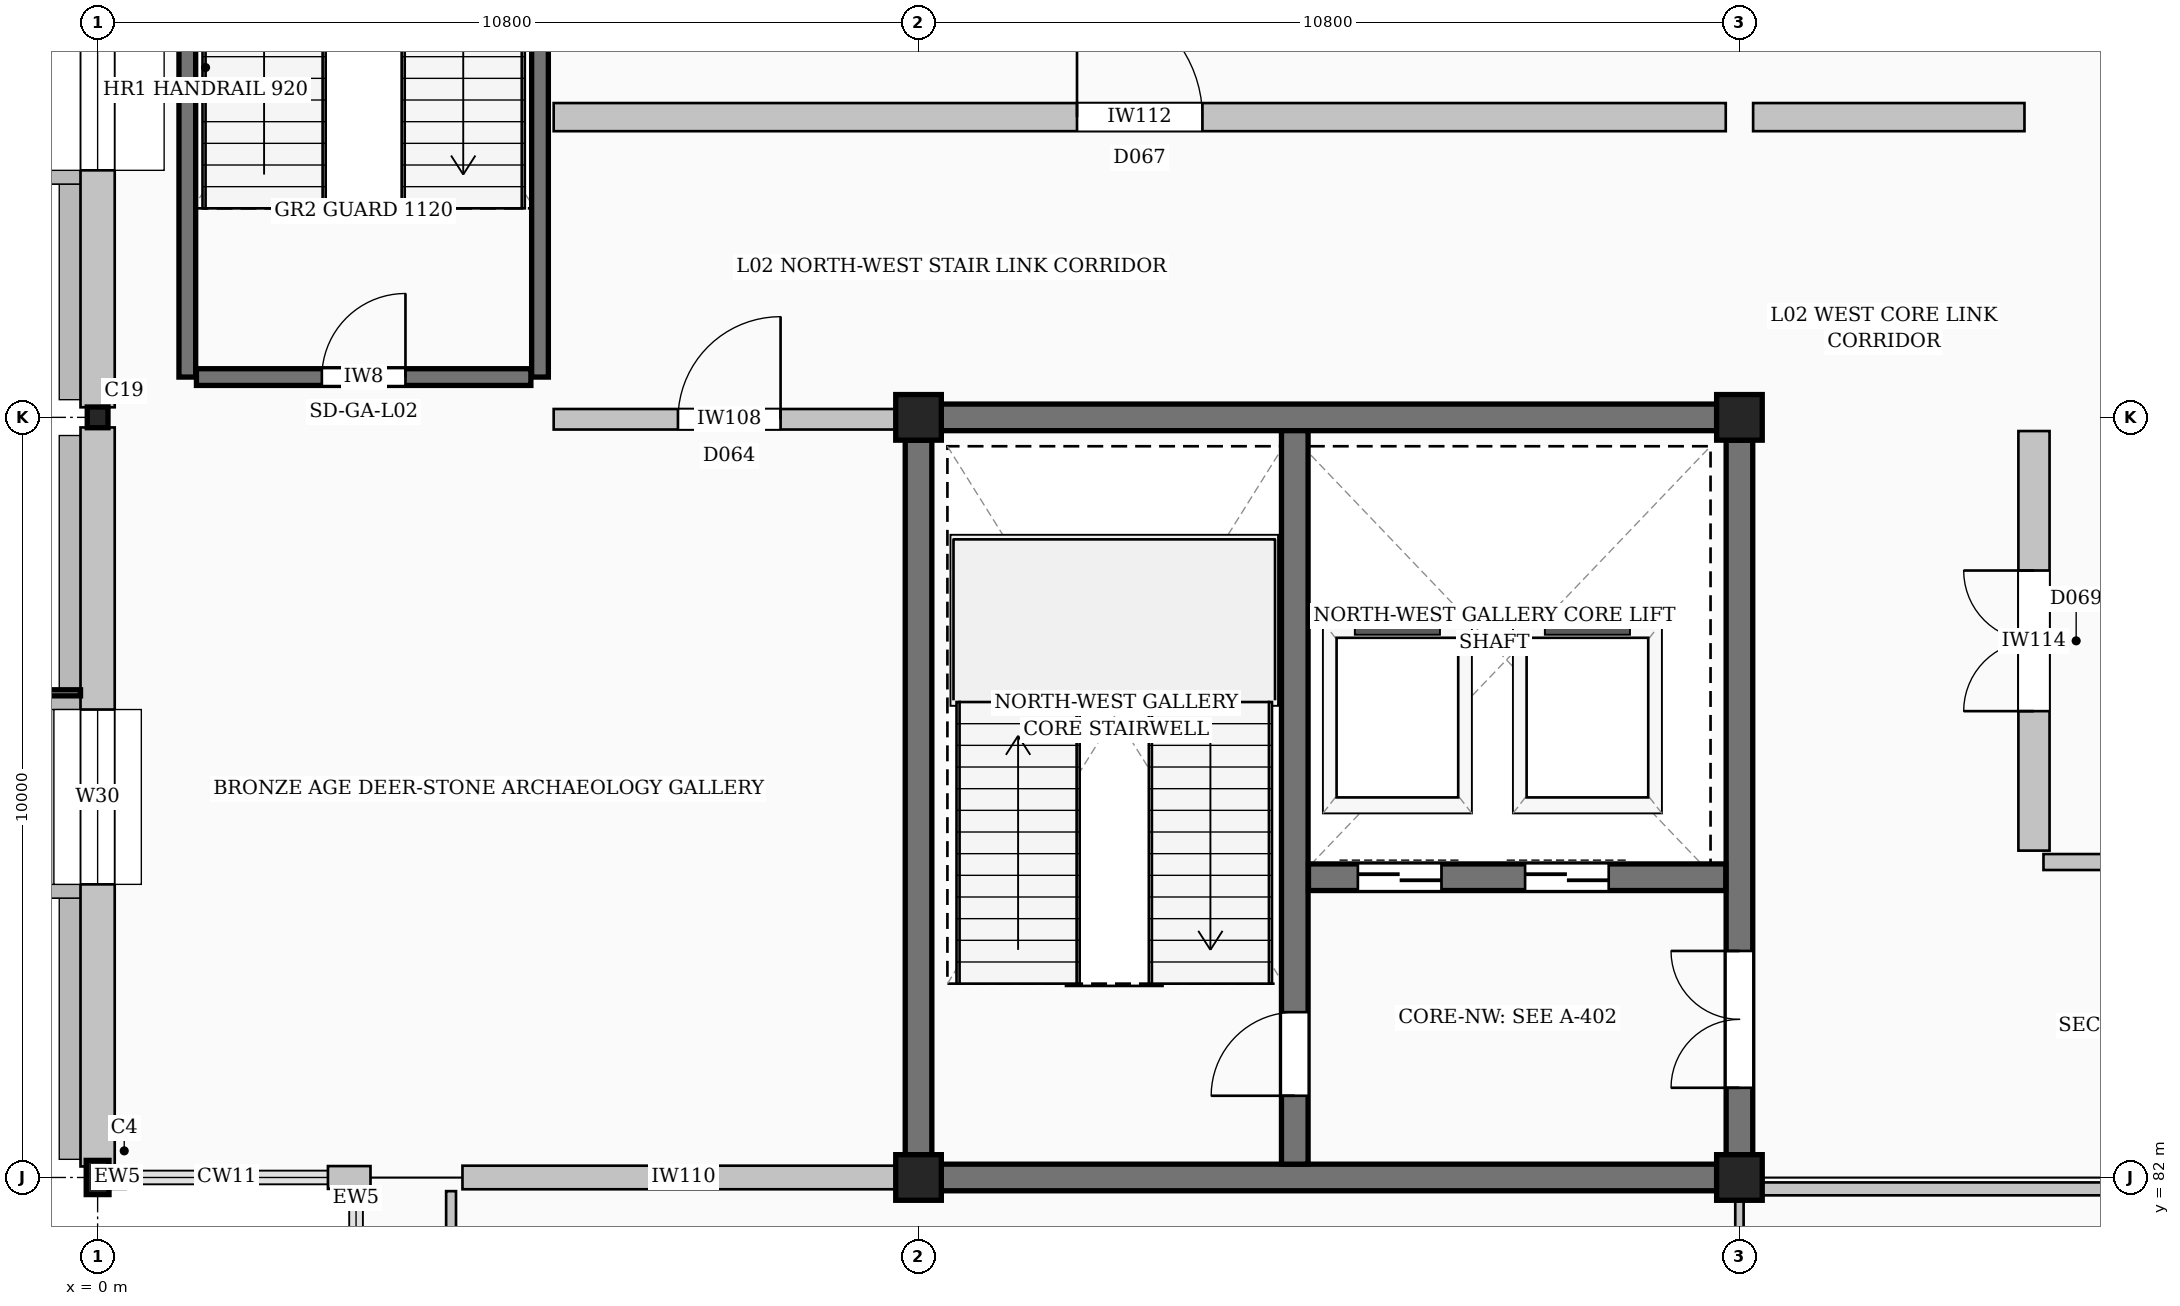
"""IFC4 building model, lengths in metres.
Left out: names, types, materials, properties, quantities, classifications, styles, units other than length and angle.
Written with IfcOpenShell. Run it as: python <this file> out.ifc"""

import sys

from ifc_helpers import new_model, si_unit, direction, frame, frame_2d, origin, origin_2d, place, context, subcontext, project, spatial, rectangle, hollow_circle, i_section, extrude, element, fill, save


model = new_model("IFC4")
c1 = context("Model", 3, precision=1e-05, world=origin(), true_north=direction((0.0, 1.0)))
c2 = subcontext(c1, "Body", "Model", "MODEL_VIEW")
j1 = project(units=[si_unit("LENGTHUNIT", "METRE"), si_unit("PLANEANGLEUNIT", "RADIAN")], contexts=[c1])
p1 = place(None, origin())
s1 = spatial("IfcSite", under=j1, at=p1, CompositionType="ELEMENT")
p2 = place(p1, origin())
s2 = spatial("IfcBuilding", under=s1, at=p2, CompositionType="ELEMENT")
p3 = place(p2, frame((0.0, 0.0, 9.6)))
s3 = spatial("IfcBuildingStorey", under=s2, at=p3, CompositionType="ELEMENT", Elevation=9.6)
p4 = place(p3, frame((0.0, 82.0, 0.0), z_axis=(0.0, 0.0, 1.0), x_axis=(1.0, 0.0, 0.0)))
e1 = element("IfcColumn", 1, at=p4, inside=s3, PredefinedType="COLUMN", context=c2, shape_type="SweptSolid", body=[
    extrude(i_section(OverallWidth=0.3, OverallDepth=0.45, WebThickness=0.014, FlangeThickness=0.026, FilletRadius=0.027, at=origin_2d()), origin(), (0.0, 0.0, 1.0), 4.8),
])
p5 = place(p3, frame((0.0, 92.0, 0.0), z_axis=(0.0, 0.0, 1.0), x_axis=(1.0, 0.0, 0.0)))
e2 = element("IfcColumn", 2, at=p5, inside=s3, PredefinedType="COLUMN", context=c2, shape_type="SweptSolid", body=[
    extrude(hollow_circle(Radius=0.136, WallThickness=0.012, at=origin_2d()), origin(), (0.0, 0.0, 1.0), 4.8),
])
for number, where, z_axis, x_axis in (
    (3, (10.8, 82.0, 0.0), (0.0, 0.0, 1.0), (1.0, 0.0, 0.0)),
    (4, (10.8, 92.0, 0.0), (0.0, 0.0, 1.0), (1.0, 0.0, 0.0)),
    (5, (21.6, 82.0, 0.0), (0.0, 0.0, 1.0), (1.0, 0.0, 0.0)),
    (6, (21.6, 92.0, 0.0), (0.0, 0.0, 1.0), (1.0, 0.0, 0.0)),
):
    element("IfcColumn", number, at=place(p3, frame(where, z_axis=z_axis, x_axis=x_axis)), inside=s3, PredefinedType="COLUMN", context=c2, shape_type="SweptSolid", body=[
        extrude(rectangle(XDim=0.6, YDim=0.6, at=origin_2d()), origin(), (0.0, 0.0, 1.0), 4.8),
    ])
p6 = place(p3, frame((0.0, 101.867, 0.0), z_axis=(0.0, 0.0, 1.0), x_axis=(0.0, -1.0, 0.0)))
e7 = element("IfcWall", 7, at=p6, inside=s3, PredefinedType="STANDARD", context=c2, shape_type="SweptSolid", body=[
    extrude(rectangle(XDim=9.735, YDim=0.45, at=frame_2d((4.867, 0.0))), origin(), (0.0, 0.0, 1.0), 4.56),
])
p7 = place(p6, frame((3.117, 0.0, 1.0)))
e8 = element("IfcOpeningElement", 8, at=p7, cuts=e7, PredefinedType="OPENING", context=c2, shape_type="SweptSolid", body=[
    extrude(rectangle(XDim=3.5, YDim=2.3, at=frame_2d((1.75, 1.15))), frame((0.0, 0.235, 0.0), z_axis=(0.0, -1.0, 0.0), x_axis=(1.0, 0.0, 0.0)), (0.0, 0.0, 1.0), 0.47),
])
p8 = place(p3, frame((0.0, 91.867, 0.0), z_axis=(0.0, 0.0, 1.0), x_axis=(0.0, -1.0, 0.0)))
e9 = element("IfcWall", 9, at=p8, inside=s3, PredefinedType="STANDARD", context=c2, shape_type="SweptSolid", body=[
    extrude(rectangle(XDim=9.722, YDim=0.45, at=frame_2d((4.861, 0.0))), origin(), (0.0, 0.0, 1.0), 4.56),
])
p9 = place(p8, frame((3.711, 0.0, 1.0)))
e10 = element("IfcOpeningElement", 10, at=p9, cuts=e9, PredefinedType="OPENING", context=c2, shape_type="SweptSolid", body=[
    extrude(rectangle(XDim=2.3, YDim=2.3, at=frame_2d((1.15, 1.15))), frame((0.0, 0.235, 0.0), z_axis=(0.0, -1.0, 0.0), x_axis=(1.0, 0.0, 0.0)), (0.0, 0.0, 1.0), 0.47),
])
p10 = place(p3, frame((0.145, 82.0, 0.0), z_axis=(0.0, 0.0, 1.0), x_axis=(1.0, 0.0, 0.0)))
e11 = element("IfcWall", 11, at=p10, inside=s3, PredefinedType="STANDARD", context=c2, shape_type="SweptSolid", body=[
    extrude(rectangle(XDim=0.225, YDim=0.3, at=frame_2d((0.113, 0.0))), origin(), (0.0, 0.0, 1.0), 4.56),
])
p11 = place(p3, frame((3.03, 82.0, 0.0), z_axis=(0.0, 0.0, 1.0), x_axis=(1.0, 0.0, 0.0)))
e12 = element("IfcWall", 12, at=p11, inside=s3, PredefinedType="STANDARD", context=c2, shape_type="SweptSolid", body=[
    extrude(rectangle(XDim=0.56, YDim=0.3, at=frame_2d((0.28, 0.0))), origin(), (0.0, 0.0, 1.0), 4.56),
])
p12 = place(p3, frame((3.4, 81.82, 0.0), z_axis=(0.0, 0.0, 1.0), x_axis=(0.0, -1.0, 0.0)))
e13 = element("IfcWall", 13, at=p12, inside=s3, PredefinedType="STANDARD", context=c2, shape_type="SweptSolid", body=[
    extrude(rectangle(XDim=0.19, YDim=0.3, at=frame_2d((0.095, 0.0))), origin(), (0.0, 0.0, 1.0), 4.56),
])
for number, where, z_axis, x_axis in (
    (14, (11.1, 82.0, 0.0), (0.0, 0.0, 1.0), (1.0, 0.0, 0.0)),
    (15, (11.1, 92.0, 0.0), (0.0, 0.0, 1.0), (1.0, 0.0, 0.0)),
):
    element("IfcWall", number, at=place(p3, frame(where, z_axis=z_axis, x_axis=x_axis)), inside=s3, PredefinedType="SHEAR", context=c2, shape_type="SweptSolid", body=[
        extrude(rectangle(XDim=10.2, YDim=0.35, at=frame_2d((5.1, 0.0))), origin(), (0.0, 0.0, 1.0), 4.56),
    ])
p13 = place(p3, frame((10.8, 82.3, 0.0), z_axis=(0.0, 0.0, 1.0), x_axis=(0.0, 1.0, 0.0)))
e16 = element("IfcWall", 16, at=p13, inside=s3, PredefinedType="SHEAR", context=c2, shape_type="SweptSolid", body=[
    extrude(rectangle(XDim=9.4, YDim=0.35, at=frame_2d((4.7, 0.0))), origin(), (0.0, 0.0, 1.0), 4.56),
])
p14 = place(p3, frame((21.6, 82.3, 0.0), z_axis=(0.0, 0.0, 1.0), x_axis=(0.0, 1.0, 0.0)))
e17 = element("IfcWall", 17, at=p14, inside=s3, PredefinedType="SHEAR", context=c2, shape_type="SweptSolid", body=[
    extrude(rectangle(XDim=9.4, YDim=0.35, at=frame_2d((4.7, 0.0))), origin(), (0.0, 0.0, 1.0), 4.56),
])
p15 = place(p14, frame((0.88, 0.0, 0.0)))
e18 = element("IfcOpeningElement", 18, at=p15, cuts=e17, PredefinedType="OPENING", context=c2, shape_type="SweptSolid", body=[
    extrude(rectangle(XDim=1.8, YDim=2.25, at=frame_2d((0.9, 1.125))), frame((0.0, 0.185, 0.0), z_axis=(0.0, -1.0, 0.0), x_axis=(1.0, 0.0, 0.0)), (0.0, 0.0, 1.0), 0.37),
])
p16 = place(p3, frame((15.75, 82.175, 0.0), z_axis=(0.0, 0.0, 1.0), x_axis=(0.0, 1.0, 0.0)))
e19 = element("IfcWall", 19, at=p16, inside=s3, PredefinedType="SHEAR", context=c2, shape_type="SweptSolid", body=[
    extrude(rectangle(XDim=9.65, YDim=0.35, at=frame_2d((4.825, 0.0))), origin(), (0.0, 0.0, 1.0), 4.56),
])
p17 = place(p16, frame((0.9, 0.0, 0.0)))
e20 = element("IfcOpeningElement", 20, at=p17, cuts=e19, PredefinedType="OPENING", context=c2, shape_type="SweptSolid", body=[
    extrude(rectangle(XDim=1.1, YDim=2.2, at=frame_2d((0.55, 1.1))), frame((0.0, 0.185, 0.0), z_axis=(0.0, -1.0, 0.0), x_axis=(1.0, 0.0, 0.0)), (0.0, 0.0, 1.0), 0.37),
])
p18 = place(p3, frame((15.93, 85.95, 0.0), z_axis=(0.0, 0.0, 1.0), x_axis=(1.0, 0.0, 0.0)))
e21 = element("IfcWall", 21, at=p18, inside=s3, PredefinedType="SHEAR", context=c2, shape_type="SweptSolid", body=[
    extrude(rectangle(XDim=5.49, YDim=0.35, at=frame_2d((2.745, 0.0))), origin(), (0.0, 0.0, 1.0), 4.56),
])
p19 = place(p18, frame((0.65, 0.0, 0.0)))
e22 = element("IfcOpeningElement", 22, at=p19, cuts=e21, PredefinedType="OPENING", context=c2, shape_type="SweptSolid", body=[
    extrude(rectangle(XDim=1.1, YDim=2.2, at=frame_2d((0.55, 1.1))), frame((0.0, 0.185, 0.0), z_axis=(0.0, -1.0, 0.0), x_axis=(1.0, 0.0, 0.0)), (0.0, 0.0, 1.0), 0.37),
])
p20 = place(p18, frame((2.85, 0.0, 0.0)))
e23 = element("IfcOpeningElement", 23, at=p20, cuts=e21, PredefinedType="OPENING", context=c2, shape_type="SweptSolid", body=[
    extrude(rectangle(XDim=1.1, YDim=2.2, at=frame_2d((0.55, 1.1))), frame((0.0, 0.185, 0.0), z_axis=(0.0, -1.0, 0.0), x_axis=(1.0, 0.0, 0.0)), (0.0, 0.0, 1.0), 0.37),
])
for number, where, z_axis, x_axis in (
    (24, (1.18, 92.53, 0.0), (0.0, 0.0, 1.0), (0.0, 1.0, 0.0)),
    (25, (5.82, 92.53, 0.0), (0.0, 0.0, 1.0), (0.0, 1.0, 0.0)),
):
    element("IfcWall", number, at=place(p3, frame(where, z_axis=z_axis, x_axis=x_axis)), inside=s3, PredefinedType="SHEAR", context=c2, shape_type="SweptSolid", body=[
        extrude(rectangle(XDim=9.14, YDim=0.22, at=frame_2d((4.57, 0.0))), origin(), (0.0, 0.0, 1.0), 4.56),
    ])
p21 = place(p3, frame((1.3, 92.53, 0.0), z_axis=(0.0, 0.0, 1.0), x_axis=(1.0, 0.0, 0.0)))
e26 = element("IfcWall", 26, at=p21, inside=s3, PredefinedType="SHEAR", context=c2, shape_type="SweptSolid", body=[
    extrude(rectangle(XDim=4.4, YDim=0.22, at=frame_2d((2.2, 0.0))), origin(), (0.0, 0.0, 1.0), 4.56),
])
p22 = place(p21, frame((1.65, 0.0, 0.0)))
e27 = element("IfcOpeningElement", 27, at=p22, cuts=e26, PredefinedType="OPENING", context=c2, shape_type="SweptSolid", body=[
    extrude(rectangle(XDim=1.1, YDim=2.2, at=frame_2d((0.55, 1.1))), frame((0.0, 0.12, 0.0), z_axis=(0.0, -1.0, 0.0), x_axis=(1.0, 0.0, 0.0)), (0.0, 0.0, 1.0), 0.24),
])
p23 = place(p3, frame((21.78, 81.85, 0.0), z_axis=(0.0, 0.0, 1.0), x_axis=(1.0, 0.0, 0.0)))
e28 = element("IfcWall", 28, at=p23, inside=s3, PredefinedType="PARTITIONING", context=c2, shape_type="SweptSolid", body=[
    extrude(rectangle(XDim=10.42, YDim=0.17, at=frame_2d((5.21, 0.0))), origin(), (0.0, 0.0, 1.0), 3.94),
])
p24 = place(p3, frame((25.6, 86.15, 0.0), z_axis=(0.0, 0.0, 1.0), x_axis=(1.0, 0.0, 0.0)))
e29 = element("IfcWall", 29, at=p24, inside=s3, PredefinedType="PARTITIONING", context=c2, shape_type="SweptSolid", body=[
    extrude(rectangle(XDim=28.22, YDim=0.21, at=frame_2d((14.11, 0.0))), origin(), (0.0, 0.0, 1.0), 4.52),
])
p25 = place(p24, frame((13.535, 0.0, 0.0)))
e30 = element("IfcOpeningElement", 30, at=p25, cuts=e29, PredefinedType="OPENING", context=c2, shape_type="SweptSolid", body=[
    extrude(rectangle(XDim=1.15, YDim=2.25, at=frame_2d((0.575, 1.125))), frame((0.0, 0.115, 0.0), z_axis=(0.0, -1.0, 0.0), x_axis=(1.0, 0.0, 0.0)), (0.0, 0.0, 1.0), 0.23),
])
p26 = place(p3, frame((6.0, 91.975, 0.0), z_axis=(0.0, 0.0, 1.0), x_axis=(1.0, 0.0, 0.0)))
e31 = element("IfcWall", 31, at=p26, inside=s3, PredefinedType="PARTITIONING", context=c2, shape_type="SweptSolid", body=[
    extrude(rectangle(XDim=4.62, YDim=0.27, at=frame_2d((2.31, 0.0))), origin(), (0.0, 0.0, 1.0), 4.119),
])
p27 = place(p26, frame((1.635, 0.0, 0.0)))
e32 = element("IfcOpeningElement", 32, at=p27, cuts=e31, PredefinedType="OPENING", context=c2, shape_type="SweptSolid", body=[
    extrude(rectangle(XDim=1.35, YDim=2.35, at=frame_2d((0.675, 1.175))), frame((0.0, 0.145, 0.0), z_axis=(0.0, -1.0, 0.0), x_axis=(1.0, 0.0, 0.0)), (0.0, 0.0, 1.0), 0.29),
])
p28 = place(p3, frame((6.0, 95.95, 0.0), z_axis=(0.0, 0.0, 1.0), x_axis=(1.0, 0.0, 0.0)))
e33 = element("IfcWall", 33, at=p28, inside=s3, PredefinedType="PARTITIONING", context=c2, shape_type="SweptSolid", body=[
    extrude(rectangle(XDim=15.42, YDim=0.37, at=frame_2d((7.71, 0.0))), origin(), (0.0, 0.0, 1.0), 4.52),
])
p29 = place(p28, frame((6.885, 0.0, 0.0)))
e34 = element("IfcOpeningElement", 34, at=p29, cuts=e33, PredefinedType="OPENING", context=c2, shape_type="SweptSolid", body=[
    extrude(rectangle(XDim=1.65, YDim=2.4, at=frame_2d((0.825, 1.2))), frame((0.0, 0.195, 0.0), z_axis=(0.0, -1.0, 0.0), x_axis=(1.0, 0.0, 0.0)), (0.0, 0.0, 1.0), 0.39),
])
p30 = place(p3, frame((25.475, 86.3, 0.0), z_axis=(0.0, 0.0, 1.0), x_axis=(0.0, 1.0, 0.0)))
e35 = element("IfcWall", 35, at=p30, inside=s3, PredefinedType="PARTITIONING", context=c2, shape_type="SweptSolid", body=[
    extrude(rectangle(XDim=5.52, YDim=0.41, at=frame_2d((2.76, 0.0))), origin(), (0.0, 0.0, 1.0), 4.52),
])
p31 = place(p30, frame((1.835, 0.0, 0.0)))
e36 = element("IfcOpeningElement", 36, at=p31, cuts=e35, PredefinedType="OPENING", context=c2, shape_type="SweptSolid", body=[
    extrude(rectangle(XDim=1.85, YDim=2.45, at=frame_2d((0.925, 1.225))), frame((0.0, 0.215, 0.0), z_axis=(0.0, -1.0, 0.0), x_axis=(1.0, 0.0, 0.0)), (0.0, 0.0, 1.0), 0.43),
])
p32 = place(p3, frame((4.8, 82.0, 0.0), z_axis=(0.0, 0.0, 1.0), x_axis=(1.0, 0.0, 0.0)))
e37 = element("IfcWall", 37, at=p32, inside=s3, PredefinedType="PARTITIONING", context=c2, shape_type="SweptSolid", body=[
    extrude(rectangle(XDim=5.82, YDim=0.31, at=frame_2d((2.91, 0.0))), origin(), (0.0, 0.0, 1.0), 3.94),
])
p33 = place(p3, frame((21.78, 95.95, 0.0), z_axis=(0.0, 0.0, 1.0), x_axis=(1.0, 0.0, 0.0)))
e38 = element("IfcWall", 38, at=p33, inside=s3, PredefinedType="PARTITIONING", context=c2, shape_type="SweptSolid", body=[
    extrude(rectangle(XDim=3.57, YDim=0.37, at=frame_2d((1.785, 0.0))), origin(), (0.0, 0.0, 1.0), 4.52),
])
p34 = place(p3, frame((21.6, 72.2, 0.0), z_axis=(0.0, 0.0, 1.0), x_axis=(0.0, 1.0, 0.0)))
e39 = element("IfcWall", 39, at=p34, inside=s3, PredefinedType="PARTITIONING", context=c2, shape_type="SweptSolid", body=[
    extrude(rectangle(XDim=9.62, YDim=0.11, at=frame_2d((4.81, 0.0))), origin(), (0.0, 0.0, 1.0), 4.039),
])
p35 = place(p3, frame((4.65, 40.18, 0.0), z_axis=(0.0, 0.0, 1.0), x_axis=(0.0, 1.0, 0.0)))
e40 = element("IfcWall", 40, at=p35, inside=s3, PredefinedType="PARTITIONING", context=c2, shape_type="SweptSolid", body=[
    extrude(rectangle(XDim=41.64, YDim=0.13, at=frame_2d((20.82, 0.0))), origin(), (0.0, 0.0, 1.0), 4.52),
])
p36 = place(p7, origin())
e41 = element("IfcWindow", 41, at=p36, inside=s3, PartitioningType="SINGLE_PANEL", PredefinedType="WINDOW", context=c2, shape_type="SweptSolid", body=[
    extrude(rectangle(XDim=3.5, YDim=2.3, at=frame_2d((1.75, 1.15))), frame((0.0, 0.03, 0.0), z_axis=(0.0, -1.0, 0.0), x_axis=(1.0, 0.0, 0.0)), (0.0, 0.0, 1.0), 0.06),
])
fill(e8, e41)
p37 = place(p9, origin())
e42 = element("IfcWindow", 42, at=p37, inside=s3, PartitioningType="SINGLE_PANEL", PredefinedType="WINDOW", context=c2, shape_type="SweptSolid", body=[
    extrude(rectangle(XDim=2.3, YDim=2.3, at=frame_2d((1.15, 1.15))), frame((0.0, 0.03, 0.0), z_axis=(0.0, -1.0, 0.0), x_axis=(1.0, 0.0, 0.0)), (0.0, 0.0, 1.0), 0.06),
])
fill(e10, e42)
p38 = place(p17, origin())
e43 = element("IfcDoor", 43, at=p38, inside=s3, OperationType="SINGLE_SWING_LEFT", PredefinedType="DOOR", context=c2, shape_type="SweptSolid", body=[
    extrude(rectangle(XDim=1.1, YDim=2.2, at=frame_2d((0.55, 1.1))), frame((0.0, 0.025, 0.0), z_axis=(0.0, -1.0, 0.0), x_axis=(1.0, 0.0, 0.0)), (0.0, 0.0, 1.0), 0.05),
])
fill(e20, e43)
p39 = place(p15, origin())
e44 = element("IfcDoor", 44, at=p39, inside=s3, OperationType="DOUBLE_DOOR_SINGLE_SWING", PredefinedType="DOOR", context=c2, shape_type="SweptSolid", body=[
    extrude(rectangle(XDim=1.8, YDim=2.25, at=frame_2d((0.9, 1.125))), frame((0.0, 0.025, 0.0), z_axis=(0.0, -1.0, 0.0), x_axis=(1.0, 0.0, 0.0)), (0.0, 0.0, 1.0), 0.05),
])
fill(e18, e44)
p40 = place(p19, origin())
e45 = element("IfcDoor", 45, at=p40, inside=s3, OperationType="DOUBLE_DOOR_SLIDING", PredefinedType="DOOR", context=c2, shape_type="SweptSolid", body=[
    extrude(rectangle(XDim=1.1, YDim=2.2, at=frame_2d((0.55, 1.1))), frame((0.0, 0.025, 0.0), z_axis=(0.0, -1.0, 0.0), x_axis=(1.0, 0.0, 0.0)), (0.0, 0.0, 1.0), 0.05),
])
fill(e22, e45)
p41 = place(p20, origin())
e46 = element("IfcDoor", 46, at=p41, inside=s3, OperationType="DOUBLE_DOOR_SLIDING", PredefinedType="DOOR", context=c2, shape_type="SweptSolid", body=[
    extrude(rectangle(XDim=1.1, YDim=2.2, at=frame_2d((0.55, 1.1))), frame((0.0, 0.025, 0.0), z_axis=(0.0, -1.0, 0.0), x_axis=(1.0, 0.0, 0.0)), (0.0, 0.0, 1.0), 0.05),
])
fill(e23, e46)
p42 = place(p22, origin())
e47 = element("IfcDoor", 47, at=p42, inside=s3, OperationType="SINGLE_SWING_RIGHT", PredefinedType="DOOR", context=c2, shape_type="SweptSolid", body=[
    extrude(rectangle(XDim=1.1, YDim=2.2, at=frame_2d((0.55, 1.1))), frame((0.0, 0.025, 0.0), z_axis=(0.0, -1.0, 0.0), x_axis=(1.0, 0.0, 0.0)), (0.0, 0.0, 1.0), 0.05),
])
fill(e27, e47)
p43 = place(p27, origin())
e48 = element("IfcDoor", 48, at=p43, inside=s3, OperationType="SINGLE_SWING_RIGHT", PredefinedType="DOOR", context=c2, shape_type="SweptSolid", body=[
    extrude(rectangle(XDim=1.35, YDim=2.35, at=frame_2d((0.675, 1.175))), frame((0.0, 0.025, 0.0), z_axis=(0.0, -1.0, 0.0), x_axis=(1.0, 0.0, 0.0)), (0.0, 0.0, 1.0), 0.05),
])
fill(e32, e48)
p44 = place(p29, origin())
e49 = element("IfcDoor", 49, at=p44, inside=s3, OperationType="SINGLE_SWING_LEFT", PredefinedType="DOOR", context=c2, shape_type="SweptSolid", body=[
    extrude(rectangle(XDim=1.65, YDim=2.4, at=frame_2d((0.825, 1.2))), frame((0.0, 0.025, 0.0), z_axis=(0.0, -1.0, 0.0), x_axis=(1.0, 0.0, 0.0)), (0.0, 0.0, 1.0), 0.05),
])
fill(e34, e49)
p45 = place(p31, origin())
e50 = element("IfcDoor", 50, at=p45, inside=s3, OperationType="DOUBLE_DOOR_SINGLE_SWING", PredefinedType="DOOR", context=c2, shape_type="SweptSolid", body=[
    extrude(rectangle(XDim=1.85, YDim=2.45, at=frame_2d((0.925, 1.225))), frame((0.0, 0.025, 0.0), z_axis=(0.0, -1.0, 0.0), x_axis=(1.0, 0.0, 0.0)), (0.0, 0.0, 1.0), 0.05),
])
fill(e36, e50)
save(model, sys.argv[1])
